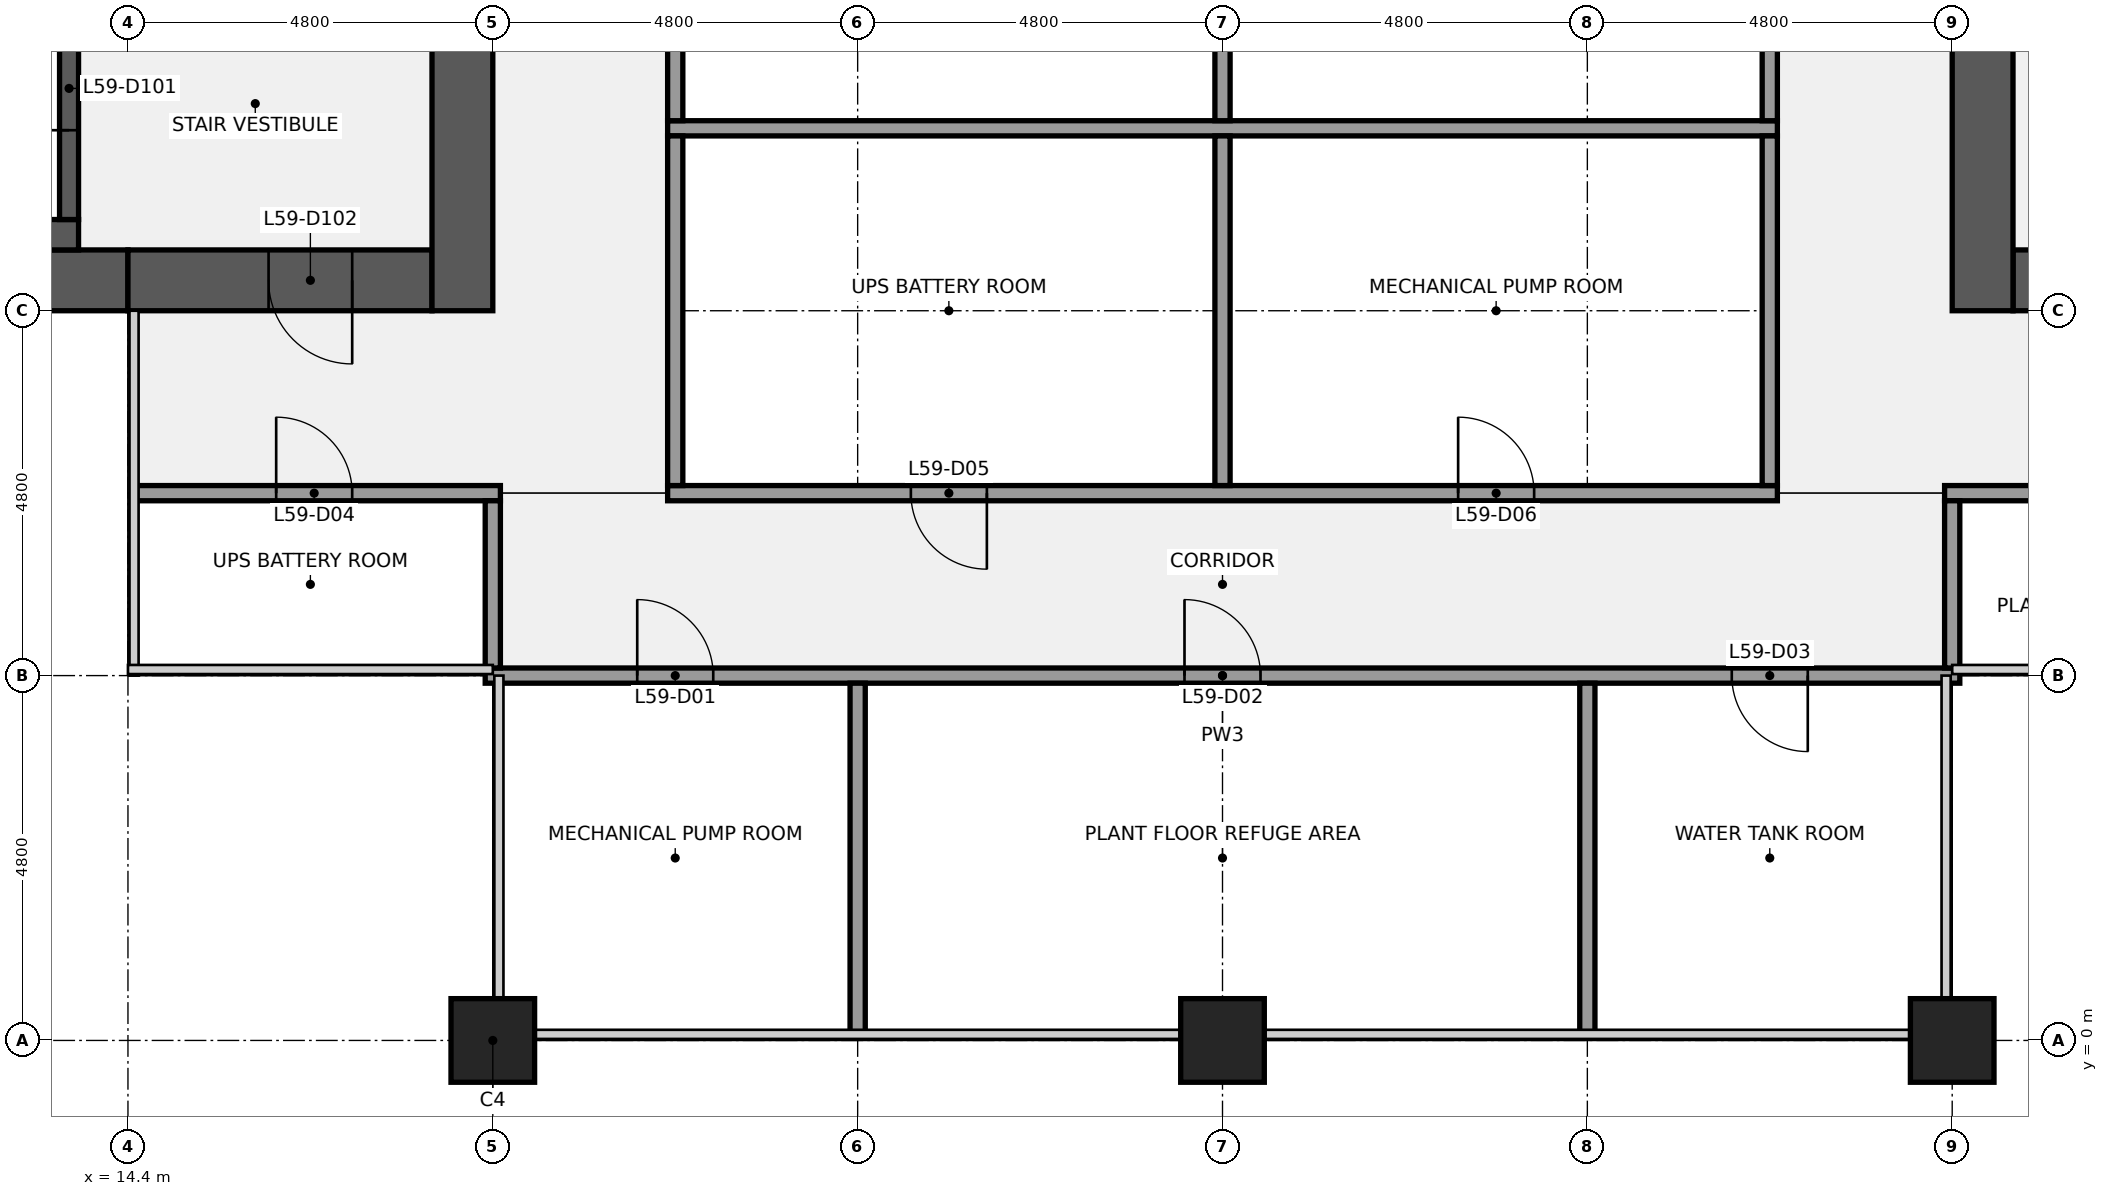
"""IFC4 building model, lengths in metres.
Left out: names, types, materials, properties, quantities, classifications, styles, units other than length and angle.
Written with IfcOpenShell. Run it as: python <this file> out.ifc"""

import sys

from ifc_helpers import new_model, si_unit, direction, frame, frame_2d, origin, origin_2d, place, context, subcontext, project, spatial, rectangle, extrude, element, fill, save


model = new_model("IFC4")
c1 = context("Model", 3, precision=1e-05, world=origin(), true_north=direction((0.0, 1.0)))
c2 = subcontext(c1, "Body", "Model", "MODEL_VIEW")
j1 = project(units=[si_unit("LENGTHUNIT", "METRE"), si_unit("PLANEANGLEUNIT", "RADIAN")], contexts=[c1])
p1 = place(None, origin())
s1 = spatial("IfcSite", under=j1, at=p1, CompositionType="ELEMENT")
p2 = place(p1, origin())
s2 = spatial("IfcBuilding", under=s1, at=p2, CompositionType="ELEMENT")
p3 = place(p2, frame((0.0, 0.0, 265.2)))
s3 = spatial("IfcBuildingStorey", under=s2, at=p3, CompositionType="ELEMENT", Elevation=265.2)
for number, where, z_axis, x_axis in (
    (1, (19.2, 0.0, 0.0), (0.0, 0.0, 1.0), (1.0, 0.0, 0.0)),
    (2, (28.8, 0.0, 0.0), (0.0, 0.0, 1.0), (1.0, 0.0, 0.0)),
    (3, (38.4, 0.0, 0.0), (0.0, 0.0, 1.0), (1.0, 0.0, 0.0)),
):
    element("IfcColumn", number, at=place(p3, frame(where, z_axis=z_axis, x_axis=x_axis)), inside=s3, PredefinedType="COLUMN", context=c2, shape_type="SweptSolid", body=[
        extrude(rectangle(XDim=1.1, YDim=1.1, at=origin_2d()), origin(), (0.0, 0.0, 1.0), 4.5),
    ])
p4 = place(p3, frame((14.4, 10.0, 0.0), z_axis=(0.0, 0.0, 1.0), x_axis=(-1.0, 0.0, 0.0)))
e4 = element("IfcWall", 4, at=p4, inside=s3, PredefinedType="SHEAR", context=c2, shape_type="SweptSolid", body=[
    extrude(rectangle(XDim=13.6, YDim=0.8, at=frame_2d((6.8, 0.0))), origin(), (0.0, 0.0, 1.0), 4.1),
])
p5 = place(p4, frame((6.3, 0.0, 0.9)))
e5 = element("IfcOpeningElement", 5, at=p5, cuts=e4, PredefinedType="OPENING", context=c2, shape_type="SweptSolid", body=[
    extrude(rectangle(XDim=1.8, YDim=1.5, at=frame_2d((0.9, 0.75))), frame((0.0, 0.41, 0.0), z_axis=(0.0, -1.0, 0.0), x_axis=(1.0, 0.0, 0.0)), (0.0, 0.0, 1.0), 0.82),
])
p6 = place(p4, frame((1.5, 0.0, 0.9)))
e6 = element("IfcOpeningElement", 6, at=p6, cuts=e4, PredefinedType="OPENING", context=c2, shape_type="SweptSolid", body=[
    extrude(rectangle(XDim=1.8, YDim=1.5, at=frame_2d((0.9, 0.75))), frame((0.0, 0.41, 0.0), z_axis=(0.0, -1.0, 0.0), x_axis=(1.0, 0.0, 0.0)), (0.0, 0.0, 1.0), 0.82),
])
p7 = place(p3, frame((18.4, 10.0, 0.0), z_axis=(0.0, 0.0, 1.0), x_axis=(-1.0, 0.0, 0.0)))
e7 = element("IfcWall", 7, at=p7, inside=s3, PredefinedType="SHEAR", context=c2, shape_type="SweptSolid", body=[
    extrude(rectangle(XDim=4.0, YDim=0.8, at=frame_2d((2.0, 0.0))), origin(), (0.0, 0.0, 1.0), 4.1),
])
p8 = place(p7, frame((1.05, 0.0, 0.0)))
e8 = element("IfcOpeningElement", 8, at=p8, cuts=e7, PredefinedType="OPENING", context=c2, shape_type="SweptSolid", body=[
    extrude(rectangle(XDim=1.1, YDim=2.1, at=frame_2d((0.55, 1.05))), frame((0.0, 0.41, 0.0), z_axis=(0.0, -1.0, 0.0), x_axis=(1.0, 0.0, 0.0)), (0.0, 0.0, 1.0), 0.82),
])
p9 = place(p3, frame((18.8, 38.4, 0.0), z_axis=(0.0, 0.0, 1.0), x_axis=(0.0, -1.0, 0.0)))
e9 = element("IfcWall", 9, at=p9, inside=s3, PredefinedType="SHEAR", context=c2, shape_type="SweptSolid", body=[
    extrude(rectangle(XDim=28.8, YDim=0.8, at=frame_2d((14.4, 0.0))), origin(), (0.0, 0.0, 1.0), 4.1),
])
p10 = place(p9, frame((18.3, 0.0, 0.0)))
e10 = element("IfcOpeningElement", 10, at=p10, cuts=e9, PredefinedType="OPENING", context=c2, shape_type="SweptSolid", body=[
    extrude(rectangle(XDim=1.8, YDim=2.1, at=frame_2d((0.9, 1.05))), frame((0.0, 0.41, 0.0), z_axis=(0.0, -1.0, 0.0), x_axis=(1.0, 0.0, 0.0)), (0.0, 0.0, 1.0), 0.82),
])
p11 = place(p9, frame((8.7, 0.0, 0.0)))
e11 = element("IfcOpeningElement", 11, at=p11, cuts=e9, PredefinedType="OPENING", context=c2, shape_type="SweptSolid", body=[
    extrude(rectangle(XDim=1.8, YDim=2.1, at=frame_2d((0.9, 1.05))), frame((0.0, 0.41, 0.0), z_axis=(0.0, -1.0, 0.0), x_axis=(1.0, 0.0, 0.0)), (0.0, 0.0, 1.0), 0.82),
])
p12 = place(p3, frame((6.25, 10.6, 0.0), z_axis=(0.0, 0.0, 1.0), x_axis=(1.0, 0.0, 0.0)))
e12 = element("IfcWall", 12, at=p12, inside=s3, PredefinedType="SHEAR", context=c2, shape_type="SweptSolid", body=[
    extrude(rectangle(XDim=7.5, YDim=0.4, at=frame_2d((3.75, 0.0))), origin(), (0.0, 0.0, 1.0), 4.1),
])
p13 = place(p3, frame((13.625, 10.8, 0.0), z_axis=(0.0, 0.0, 1.0), x_axis=(0.0, 1.0, 0.0)))
e13 = element("IfcWall", 13, at=p13, inside=s3, PredefinedType="SHEAR", context=c2, shape_type="SweptSolid", body=[
    extrude(rectangle(XDim=3.45, YDim=0.25, at=frame_2d((1.725, 0.0))), origin(), (0.0, 0.0, 1.0), 4.1),
])
p14 = place(p13, frame((1.175, 0.0, 0.0)))
e14 = element("IfcOpeningElement", 14, at=p14, cuts=e13, PredefinedType="OPENING", context=c2, shape_type="SweptSolid", body=[
    extrude(rectangle(XDim=1.1, YDim=2.1, at=frame_2d((0.55, 1.05))), frame((0.0, 0.135, 0.0), z_axis=(0.0, -1.0, 0.0), x_axis=(1.0, 0.0, 0.0)), (0.0, 0.0, 1.0), 0.27),
])
p15 = place(p3, frame((43.2, 10.0, 0.0), z_axis=(0.0, 0.0, 1.0), x_axis=(-1.0, 0.0, 0.0)))
e15 = element("IfcWall", 15, at=p15, inside=s3, PredefinedType="SHEAR", context=c2, shape_type="SweptSolid", body=[
    extrude(rectangle(XDim=4.0, YDim=0.8, at=frame_2d((2.0, 0.0))), origin(), (0.0, 0.0, 1.0), 4.1),
])
p16 = place(p15, frame((1.85, 0.0, 0.0)))
e16 = element("IfcOpeningElement", 16, at=p16, cuts=e15, PredefinedType="OPENING", context=c2, shape_type="SweptSolid", body=[
    extrude(rectangle(XDim=1.1, YDim=2.1, at=frame_2d((0.55, 1.05))), frame((0.0, 0.41, 0.0), z_axis=(0.0, -1.0, 0.0), x_axis=(1.0, 0.0, 0.0)), (0.0, 0.0, 1.0), 0.82),
])
p17 = place(p3, frame((38.8, 9.6, 0.0), z_axis=(0.0, 0.0, 1.0), x_axis=(0.0, 1.0, 0.0)))
e17 = element("IfcWall", 17, at=p17, inside=s3, PredefinedType="SHEAR", context=c2, shape_type="SweptSolid", body=[
    extrude(rectangle(XDim=28.8, YDim=0.8, at=frame_2d((14.4, 0.0))), origin(), (0.0, 0.0, 1.0), 4.1),
])
p18 = place(p17, frame((8.7, 0.0, 0.0)))
e18 = element("IfcOpeningElement", 18, at=p18, cuts=e17, PredefinedType="OPENING", context=c2, shape_type="SweptSolid", body=[
    extrude(rectangle(XDim=1.8, YDim=2.1, at=frame_2d((0.9, 1.05))), frame((0.0, 0.41, 0.0), z_axis=(0.0, -1.0, 0.0), x_axis=(1.0, 0.0, 0.0)), (0.0, 0.0, 1.0), 0.82),
])
p19 = place(p17, frame((18.3, 0.0, 0.0)))
e19 = element("IfcOpeningElement", 19, at=p19, cuts=e17, PredefinedType="OPENING", context=c2, shape_type="SweptSolid", body=[
    extrude(rectangle(XDim=1.8, YDim=2.1, at=frame_2d((0.9, 1.05))), frame((0.0, 0.41, 0.0), z_axis=(0.0, -1.0, 0.0), x_axis=(1.0, 0.0, 0.0)), (0.0, 0.0, 1.0), 0.82),
])
p20 = place(p3, frame((19.1, 4.8, 0.0), z_axis=(0.0, 0.0, 1.0), x_axis=(1.0, 0.0, 0.0)))
e20 = element("IfcWall", 20, at=p20, inside=s3, PredefinedType="PARTITIONING", context=c2, shape_type="SweptSolid", body=[
    extrude(rectangle(XDim=19.4, YDim=0.2, at=frame_2d((9.7, 0.0))), origin(), (0.0, 0.0, 1.0), 2.993),
])
p21 = place(p20, frame((2.0, 0.0, 0.0)))
e21 = element("IfcOpeningElement", 21, at=p21, cuts=e20, PredefinedType="OPENING", context=c2, shape_type="SweptSolid", body=[
    extrude(rectangle(XDim=1.0, YDim=2.1, at=frame_2d((0.5, 1.05))), frame((0.0, 0.11, 0.0), z_axis=(0.0, -1.0, 0.0), x_axis=(1.0, 0.0, 0.0)), (0.0, 0.0, 1.0), 0.22),
])
p22 = place(p20, frame((9.2, 0.0, 0.0)))
e22 = element("IfcOpeningElement", 22, at=p22, cuts=e20, PredefinedType="OPENING", context=c2, shape_type="SweptSolid", body=[
    extrude(rectangle(XDim=1.0, YDim=2.1, at=frame_2d((0.5, 1.05))), frame((0.0, 0.11, 0.0), z_axis=(0.0, -1.0, 0.0), x_axis=(1.0, 0.0, 0.0)), (0.0, 0.0, 1.0), 0.22),
])
p23 = place(p20, frame((16.4, 0.0, 0.0)))
e23 = element("IfcOpeningElement", 23, at=p23, cuts=e20, PredefinedType="OPENING", context=c2, shape_type="SweptSolid", body=[
    extrude(rectangle(XDim=1.0, YDim=2.1, at=frame_2d((0.5, 1.05))), frame((0.0, 0.11, 0.0), z_axis=(0.0, -1.0, 0.0), x_axis=(1.0, 0.0, 0.0)), (0.0, 0.0, 1.0), 0.22),
])
p24 = place(p3, frame((14.5, 7.2, 0.0), z_axis=(0.0, 0.0, 1.0), x_axis=(1.0, 0.0, 0.0)))
e24 = element("IfcWall", 24, at=p24, inside=s3, PredefinedType="PARTITIONING", context=c2, shape_type="SweptSolid", body=[
    extrude(rectangle(XDim=4.8, YDim=0.2, at=frame_2d((2.4, 0.0))), origin(), (0.0, 0.0, 1.0), 2.993),
])
p25 = place(p24, frame((1.85, 0.0, 0.0)))
e25 = element("IfcOpeningElement", 25, at=p25, cuts=e24, PredefinedType="OPENING", context=c2, shape_type="SweptSolid", body=[
    extrude(rectangle(XDim=1.0, YDim=2.1, at=frame_2d((0.5, 1.05))), frame((0.0, 0.11, 0.0), z_axis=(0.0, -1.0, 0.0), x_axis=(1.0, 0.0, 0.0)), (0.0, 0.0, 1.0), 0.22),
])
p26 = place(p3, frame((21.5, 7.2, 0.0), z_axis=(0.0, 0.0, 1.0), x_axis=(1.0, 0.0, 0.0)))
e26 = element("IfcWall", 26, at=p26, inside=s3, PredefinedType="PARTITIONING", context=c2, shape_type="SweptSolid", body=[
    extrude(rectangle(XDim=14.6, YDim=0.2, at=frame_2d((7.3, 0.0))), origin(), (0.0, 0.0, 1.0), 2.993),
])
p27 = place(p26, frame((3.2, 0.0, 0.0)))
e27 = element("IfcOpeningElement", 27, at=p27, cuts=e26, PredefinedType="OPENING", context=c2, shape_type="SweptSolid", body=[
    extrude(rectangle(XDim=1.0, YDim=2.1, at=frame_2d((0.5, 1.05))), frame((0.0, 0.11, 0.0), z_axis=(0.0, -1.0, 0.0), x_axis=(1.0, 0.0, 0.0)), (0.0, 0.0, 1.0), 0.22),
])
p28 = place(p26, frame((10.4, 0.0, 0.0)))
e28 = element("IfcOpeningElement", 28, at=p28, cuts=e26, PredefinedType="OPENING", context=c2, shape_type="SweptSolid", body=[
    extrude(rectangle(XDim=1.0, YDim=2.1, at=frame_2d((0.5, 1.05))), frame((0.0, 0.11, 0.0), z_axis=(0.0, -1.0, 0.0), x_axis=(1.0, 0.0, 0.0)), (0.0, 0.0, 1.0), 0.22),
])
p29 = place(p3, frame((38.3, 7.2, 0.0), z_axis=(0.0, 0.0, 1.0), x_axis=(1.0, 0.0, 0.0)))
e29 = element("IfcWall", 29, at=p29, inside=s3, PredefinedType="PARTITIONING", context=c2, shape_type="SweptSolid", body=[
    extrude(rectangle(XDim=4.8, YDim=0.2, at=frame_2d((2.4, 0.0))), origin(), (0.0, 0.0, 1.0), 2.993),
])
p30 = place(p29, frame((1.95, 0.0, 0.0)))
e30 = element("IfcOpeningElement", 30, at=p30, cuts=e29, PredefinedType="OPENING", context=c2, shape_type="SweptSolid", body=[
    extrude(rectangle(XDim=1.0, YDim=2.1, at=frame_2d((0.5, 1.05))), frame((0.0, 0.11, 0.0), z_axis=(0.0, -1.0, 0.0), x_axis=(1.0, 0.0, 0.0)), (0.0, 0.0, 1.0), 0.22),
])
p31 = place(p3, frame((21.5, 12.0, 0.0), z_axis=(0.0, 0.0, 1.0), x_axis=(1.0, 0.0, 0.0)))
e31 = element("IfcWall", 31, at=p31, inside=s3, PredefinedType="PARTITIONING", context=c2, shape_type="SweptSolid", body=[
    extrude(rectangle(XDim=14.6, YDim=0.2, at=frame_2d((7.3, 0.0))), origin(), (0.0, 0.0, 1.0), 2.993),
])
p32 = place(p3, frame((19.2, 4.9, 0.0), z_axis=(0.0, 0.0, 1.0), x_axis=(0.0, 1.0, 0.0)))
e32 = element("IfcWall", 32, at=p32, inside=s3, PredefinedType="PARTITIONING", context=c2, shape_type="SweptSolid", body=[
    extrude(rectangle(XDim=2.2, YDim=0.2, at=frame_2d((1.1, 0.0))), origin(), (0.0, 0.0, 1.0), 2.993),
])
p33 = place(p3, frame((21.6, 7.3, 0.0), z_axis=(0.0, 0.0, 1.0), x_axis=(0.0, 1.0, 0.0)))
e33 = element("IfcWall", 33, at=p33, inside=s3, PredefinedType="PARTITIONING", context=c2, shape_type="SweptSolid", body=[
    extrude(rectangle(XDim=4.6, YDim=0.2, at=frame_2d((2.3, 0.0))), origin(), (0.0, 0.0, 1.0), 2.993),
])
p34 = place(p3, frame((21.6, 12.1, 0.0), z_axis=(0.0, 0.0, 1.0), x_axis=(0.0, 1.0, 0.0)))
e34 = element("IfcWall", 34, at=p34, inside=s3, PredefinedType="PARTITIONING", context=c2, shape_type="SweptSolid", body=[
    extrude(rectangle(XDim=7.0, YDim=0.2, at=frame_2d((3.5, 0.0))), origin(), (0.0, 0.0, 1.0), 2.993),
])
p35 = place(p34, frame((3.0, 0.0, 0.0)))
e35 = element("IfcOpeningElement", 35, at=p35, cuts=e34, PredefinedType="OPENING", context=c2, shape_type="SweptSolid", body=[
    extrude(rectangle(XDim=1.0, YDim=2.1, at=frame_2d((0.5, 1.05))), frame((0.0, 0.11, 0.0), z_axis=(0.0, -1.0, 0.0), x_axis=(1.0, 0.0, 0.0)), (0.0, 0.0, 1.0), 0.22),
])
for number, where, z_axis, x_axis in (
    (36, (24.0, 0.1, 0.0), (0.0, 0.0, 1.0), (0.0, 1.0, 0.0)),
    (37, (28.8, 7.3, 0.0), (0.0, 0.0, 1.0), (0.0, 1.0, 0.0)),
):
    element("IfcWall", number, at=place(p3, frame(where, z_axis=z_axis, x_axis=x_axis)), inside=s3, PredefinedType="PARTITIONING", context=c2, shape_type="SweptSolid", body=[
        extrude(rectangle(XDim=4.6, YDim=0.2, at=frame_2d((2.3, 0.0))), origin(), (0.0, 0.0, 1.0), 2.993),
    ])
p36 = place(p3, frame((28.8, 12.1, 0.0), z_axis=(0.0, 0.0, 1.0), x_axis=(0.0, 1.0, 0.0)))
e38 = element("IfcWall", 38, at=p36, inside=s3, PredefinedType="PARTITIONING", context=c2, shape_type="SweptSolid", body=[
    extrude(rectangle(XDim=7.0, YDim=0.2, at=frame_2d((3.5, 0.0))), origin(), (0.0, 0.0, 1.0), 2.993),
])
for number, where, z_axis, x_axis in (
    (39, (33.6, 0.1, 0.0), (0.0, 0.0, 1.0), (0.0, 1.0, 0.0)),
    (40, (36.0, 7.3, 0.0), (0.0, 0.0, 1.0), (0.0, 1.0, 0.0)),
):
    element("IfcWall", number, at=place(p3, frame(where, z_axis=z_axis, x_axis=x_axis)), inside=s3, PredefinedType="PARTITIONING", context=c2, shape_type="SweptSolid", body=[
        extrude(rectangle(XDim=4.6, YDim=0.2, at=frame_2d((2.3, 0.0))), origin(), (0.0, 0.0, 1.0), 2.993),
    ])
p37 = place(p3, frame((36.0, 12.1, 0.0), z_axis=(0.0, 0.0, 1.0), x_axis=(0.0, 1.0, 0.0)))
e41 = element("IfcWall", 41, at=p37, inside=s3, PredefinedType="PARTITIONING", context=c2, shape_type="SweptSolid", body=[
    extrude(rectangle(XDim=7.0, YDim=0.2, at=frame_2d((3.5, 0.0))), origin(), (0.0, 0.0, 1.0), 2.993),
])
p38 = place(p37, frame((3.0, 0.0, 0.0)))
e42 = element("IfcOpeningElement", 42, at=p38, cuts=e41, PredefinedType="OPENING", context=c2, shape_type="SweptSolid", body=[
    extrude(rectangle(XDim=1.0, YDim=2.1, at=frame_2d((0.5, 1.05))), frame((0.0, 0.11, 0.0), z_axis=(0.0, -1.0, 0.0), x_axis=(1.0, 0.0, 0.0)), (0.0, 0.0, 1.0), 0.22),
])
p39 = place(p3, frame((38.4, 4.9, 0.0), z_axis=(0.0, 0.0, 1.0), x_axis=(0.0, 1.0, 0.0)))
e43 = element("IfcWall", 43, at=p39, inside=s3, PredefinedType="PARTITIONING", context=c2, shape_type="SweptSolid", body=[
    extrude(rectangle(XDim=2.2, YDim=0.2, at=frame_2d((1.1, 0.0))), origin(), (0.0, 0.0, 1.0), 2.993),
])
for number, where, z_axis, x_axis in (
    (44, (19.2, -1.025, 0.0), (0.0, 0.0, 1.0), (1.0, 0.0, 0.0)),
    (45, (38.4, -1.025, 0.0), (0.0, 0.0, 1.0), (1.0, 0.0, 0.0)),
):
    element("IfcColumn", number, at=place(p3, frame(where, z_axis=z_axis, x_axis=x_axis)), inside=s3, PredefinedType="PILASTER", context=c2, shape_type="SweptSolid", body=[
        extrude(rectangle(XDim=2.4, YDim=0.95, at=origin_2d()), origin(), (0.0, 0.0, 1.0), 4.5),
    ])
p40 = place(p14, origin())
e46 = element("IfcDoor", 46, at=p40, inside=s3, OperationType="SINGLE_SWING_LEFT", PredefinedType="DOOR", context=c2, shape_type="SweptSolid", body=[
    extrude(rectangle(XDim=1.1, YDim=2.1, at=frame_2d((0.55, 1.05))), frame((0.0, 0.025, 0.0), z_axis=(0.0, -1.0, 0.0), x_axis=(1.0, 0.0, 0.0)), (0.0, 0.0, 1.0), 0.05),
])
fill(e14, e46)
p41 = place(p8, origin())
e47 = element("IfcDoor", 47, at=p41, inside=s3, OperationType="SINGLE_SWING_LEFT", PredefinedType="DOOR", context=c2, shape_type="SweptSolid", body=[
    extrude(rectangle(XDim=1.1, YDim=2.1, at=frame_2d((0.55, 1.05))), frame((0.0, 0.025, 0.0), z_axis=(0.0, -1.0, 0.0), x_axis=(1.0, 0.0, 0.0)), (0.0, 0.0, 1.0), 0.05),
])
fill(e8, e47)
p42 = place(p21, origin())
e48 = element("IfcDoor", 48, at=p42, inside=s3, OperationType="SINGLE_SWING_LEFT", PredefinedType="DOOR", context=c2, shape_type="SweptSolid", body=[
    extrude(rectangle(XDim=1.0, YDim=2.1, at=frame_2d((0.5, 1.05))), frame((0.0, 0.025, 0.0), z_axis=(0.0, -1.0, 0.0), x_axis=(1.0, 0.0, 0.0)), (0.0, 0.0, 1.0), 0.05),
])
fill(e21, e48)
p43 = place(p22, origin())
e49 = element("IfcDoor", 49, at=p43, inside=s3, OperationType="SINGLE_SWING_LEFT", PredefinedType="DOOR", context=c2, shape_type="SweptSolid", body=[
    extrude(rectangle(XDim=1.0, YDim=2.1, at=frame_2d((0.5, 1.05))), frame((0.0, 0.025, 0.0), z_axis=(0.0, -1.0, 0.0), x_axis=(1.0, 0.0, 0.0)), (0.0, 0.0, 1.0), 0.05),
])
fill(e22, e49)
p44 = place(p23, origin())
e50 = element("IfcDoor", 50, at=p44, inside=s3, OperationType="SINGLE_SWING_RIGHT", PredefinedType="DOOR", context=c2, shape_type="SweptSolid", body=[
    extrude(rectangle(XDim=1.0, YDim=2.1, at=frame_2d((0.5, 1.05))), frame((0.0, 0.025, 0.0), z_axis=(0.0, -1.0, 0.0), x_axis=(1.0, 0.0, 0.0)), (0.0, 0.0, 1.0), 0.05),
])
fill(e23, e50)
p45 = place(p25, origin())
e51 = element("IfcDoor", 51, at=p45, inside=s3, OperationType="SINGLE_SWING_LEFT", PredefinedType="DOOR", context=c2, shape_type="SweptSolid", body=[
    extrude(rectangle(XDim=1.0, YDim=2.1, at=frame_2d((0.5, 1.05))), frame((0.0, 0.025, 0.0), z_axis=(0.0, -1.0, 0.0), x_axis=(1.0, 0.0, 0.0)), (0.0, 0.0, 1.0), 0.05),
])
fill(e25, e51)
p46 = place(p27, origin())
e52 = element("IfcDoor", 52, at=p46, inside=s3, OperationType="SINGLE_SWING_RIGHT", PredefinedType="DOOR", context=c2, shape_type="SweptSolid", body=[
    extrude(rectangle(XDim=1.0, YDim=2.1, at=frame_2d((0.5, 1.05))), frame((0.0, 0.025, 0.0), z_axis=(0.0, -1.0, 0.0), x_axis=(1.0, 0.0, 0.0)), (0.0, 0.0, 1.0), 0.05),
])
fill(e27, e52)
p47 = place(p28, origin())
e53 = element("IfcDoor", 53, at=p47, inside=s3, OperationType="SINGLE_SWING_LEFT", PredefinedType="DOOR", context=c2, shape_type="SweptSolid", body=[
    extrude(rectangle(XDim=1.0, YDim=2.1, at=frame_2d((0.5, 1.05))), frame((0.0, 0.025, 0.0), z_axis=(0.0, -1.0, 0.0), x_axis=(1.0, 0.0, 0.0)), (0.0, 0.0, 1.0), 0.05),
])
fill(e28, e53)
save(model, sys.argv[1])
